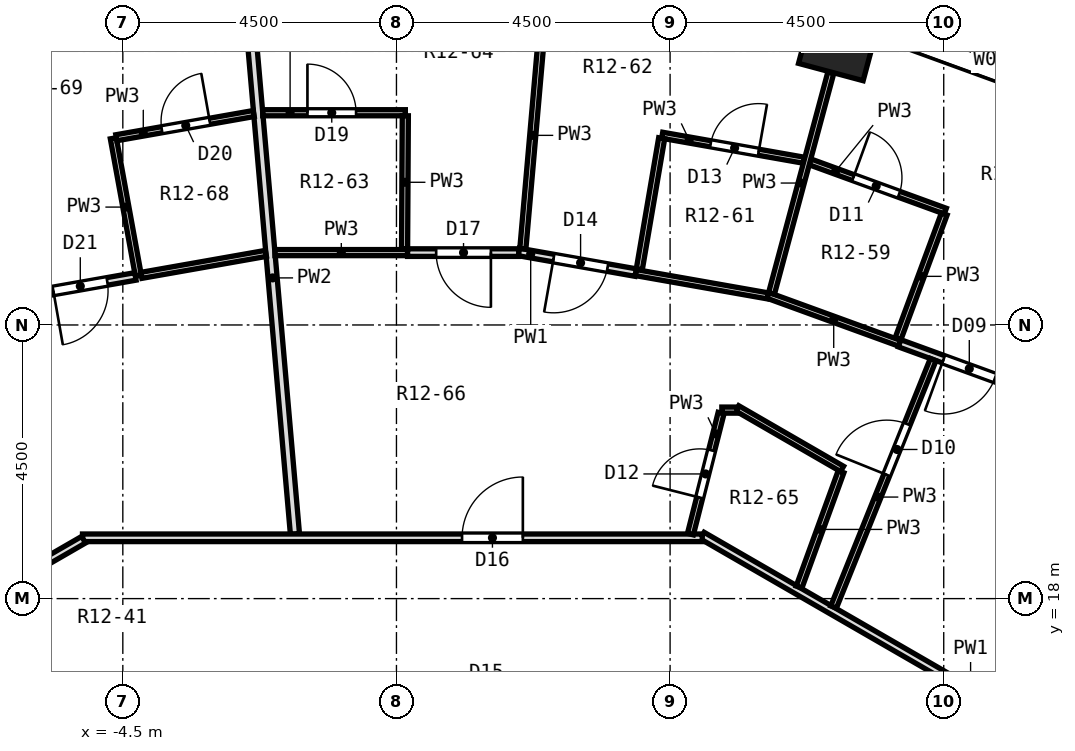
"""IFC4 building model, lengths in metres.
Left out: names, types, materials, properties, quantities, classifications, styles, units other than length and angle.
Written with IfcOpenShell. Run it as: python <this file> out.ifc"""

import sys

from ifc_helpers import new_model, si_unit, direction, frame, frame_2d, origin, origin_2d, place, context, subcontext, project, spatial, rectangle, extrude, element, fill, save


model = new_model("IFC4")
c1 = context("Model", 3, precision=1e-05, world=origin(), true_north=direction((0.0, 1.0)))
c2 = subcontext(c1, "Body", "Model", "MODEL_VIEW")
j1 = project(units=[si_unit("LENGTHUNIT", "METRE"), si_unit("PLANEANGLEUNIT", "RADIAN")], contexts=[c1])
p1 = place(None, origin())
s1 = spatial("IfcSite", under=j1, at=p1, CompositionType="ELEMENT")
p2 = place(p1, origin())
s2 = spatial("IfcBuilding", under=s1, at=p2, CompositionType="ELEMENT")
p3 = place(p2, frame((0.0, 0.0, 56.0)))
s3 = spatial("IfcBuildingStorey", under=s2, at=p3, CompositionType="ELEMENT", Elevation=56.0)
p4 = place(p3, frame((7.286, 27.191, 0.0), z_axis=(0.0, 0.0, 1.0), x_axis=(0.258819045103, 0.965925826289, 0.0)))
e1 = element("IfcColumn", 1, at=p4, inside=s3, PredefinedType="COLUMN", context=c2, shape_type="SweptSolid", body=[
    extrude(rectangle(XDim=1.1, YDim=1.1, at=origin_2d()), origin(), (0.0, 0.0, 1.0), 3.3),
])
p5 = place(p3, frame((11.585, 26.208, 0.0), z_axis=(0.0, 0.0, 1.0), x_axis=(-0.939689588564, 0.342028474173, 0.0)))
e2 = element("IfcWall", 2, at=p5, inside=s3, PredefinedType="SOLIDWALL", context=c2, shape_type="SweptSolid", body=[
    extrude(rectangle(XDim=3.846, YDim=0.6, at=frame_2d((1.923, 0.0))), origin(), (0.0, 0.0, 1.0), 2.75),
])
p6 = place(p5, frame((0.723, 0.0, 0.9)))
e3 = element("IfcOpeningElement", 3, at=p6, cuts=e2, PredefinedType="OPENING", context=c2, shape_type="SweptSolid", body=[
    extrude(rectangle(XDim=2.4, YDim=1.8, at=frame_2d((1.2, 0.9))), frame((0.0, 0.312, 0.0), z_axis=(0.0, -1.0, 0.0), x_axis=(1.0, 0.0, 0.0)), (0.0, 0.0, 1.0), 0.624),
])
p7 = place(p3, frame((-2.405, 27.485, 0.0), z_axis=(0.0, 0.0, 1.0), x_axis=(0.086942360441, -0.996213343597, 0.0)))
e4 = element("IfcWall", 4, at=p7, inside=s3, PredefinedType="PARTITIONING", context=c2, shape_type="SweptSolid", body=[
    extrude(rectangle(XDim=8.455, YDim=0.15, at=frame_2d((4.228, 0.0))), origin(), (0.0, 0.0, 1.0), 2.75),
])
p8 = place(p3, frame((-4.656, 25.57, 0.0), z_axis=(0.0, 0.0, 1.0), x_axis=(0.179165642613, -0.983818922621, 0.0)))
e5 = element("IfcWall", 5, at=p8, inside=s3, PredefinedType="PARTITIONING", context=c2, shape_type="SweptSolid", body=[
    extrude(rectangle(XDim=2.3, YDim=0.1, at=frame_2d((1.15, 0.0))), origin(), (0.0, 0.0, 1.0), 2.75),
])
p9 = place(p3, frame((5.029, 19.036, 0.0), z_axis=(0.0, 0.0, 1.0), x_axis=(0.866024825845, -0.50000100102, 0.0)))
e6 = element("IfcWall", 6, at=p9, inside=s3, PredefinedType="PARTITIONING", context=c2, shape_type="SweptSolid", body=[
    extrude(rectangle(XDim=10.192, YDim=0.125, at=frame_2d((5.096, 0.0))), origin(), (0.0, 0.0, 1.0), 2.75),
])
p10 = place(p3, frame((5.604, 21.129, 0.0), z_axis=(0.0, 0.0, 1.0), x_axis=(0.865901665176, -0.500214260339, 0.0)))
e7 = element("IfcWall", 7, at=p10, inside=s3, PredefinedType="PARTITIONING", context=c2, shape_type="SweptSolid", body=[
    extrude(rectangle(XDim=1.991, YDim=0.1, at=frame_2d((0.996, 0.0))), origin(), (0.0, 0.0, 1.0), 2.75),
])
p11 = place(p3, frame((6.107, 22.987, 0.0), z_axis=(0.0, 0.0, 1.0), x_axis=(0.939734670151, -0.34190459154, 0.0)))
e8 = element("IfcWall", 8, at=p11, inside=s3, PredefinedType="PARTITIONING", context=c2, shape_type="SweptSolid", body=[
    extrude(rectangle(XDim=2.306, YDim=0.1, at=frame_2d((1.153, 0.0))), origin(), (0.0, 0.0, 1.0), 2.75),
])
p12 = place(p3, frame((8.274, 22.199, 0.0), z_axis=(0.0, 0.0, 1.0), x_axis=(0.939613884944, -0.342236390848, 0.0)))
e9 = element("IfcWall", 9, at=p12, inside=s3, PredefinedType="PARTITIONING", context=c2, shape_type="SweptSolid", body=[
    extrude(rectangle(XDim=1.828, YDim=0.125, at=frame_2d((0.914, 0.0))), origin(), (0.0, 0.0, 1.0), 2.75),
])
p13 = place(p12, frame((0.77, 0.0, 0.0)))
e10 = element("IfcOpeningElement", 10, at=p13, cuts=e9, PredefinedType="OPENING", context=c2, shape_type="SweptSolid", body=[
    extrude(rectangle(XDim=0.9, YDim=2.1, at=frame_2d((0.45, 1.05))), frame((0.0, 0.074, 0.0), z_axis=(0.0, -1.0, 0.0), x_axis=(1.0, 0.0, 0.0)), (0.0, 0.0, 1.0), 0.149),
])
p14 = place(p3, frame((6.799, 25.183, 0.0), z_axis=(0.0, 0.0, 1.0), x_axis=(0.939651971579, -0.342131805461, 0.0)))
e11 = element("IfcWall", 11, at=p14, inside=s3, PredefinedType="PARTITIONING", context=c2, shape_type="SweptSolid", body=[
    extrude(rectangle(XDim=2.37, YDim=0.1, at=frame_2d((1.185, 0.0))), origin(), (0.0, 0.0, 1.0), 2.75),
])
p15 = place(p14, frame((0.76, 0.0, 0.0)))
e12 = element("IfcOpeningElement", 12, at=p15, cuts=e11, PredefinedType="OPENING", context=c2, shape_type="SweptSolid", body=[
    extrude(rectangle(XDim=0.8, YDim=2.1, at=frame_2d((0.4, 1.05))), frame((0.0, 0.062, 0.0), z_axis=(0.0, -1.0, 0.0), x_axis=(1.0, 0.0, 0.0)), (0.0, 0.0, 1.0), 0.124),
])
p16 = place(p3, frame((3.934, 23.362, 0.0), z_axis=(0.0, 0.0, 1.0), x_axis=(0.984819200986, -0.173583240462, 0.0)))
e13 = element("IfcWall", 13, at=p16, inside=s3, PredefinedType="PARTITIONING", context=c2, shape_type="SweptSolid", body=[
    extrude(rectangle(XDim=2.205, YDim=0.1, at=frame_2d((1.103, 0.0))), origin(), (0.0, 0.0, 1.0), 2.75),
])
p17 = place(p3, frame((2.01, 23.701, 0.0), z_axis=(0.0, 0.0, 1.0), x_axis=(0.984788592159, -0.173756809228, 0.0)))
e14 = element("IfcWall", 14, at=p17, inside=s3, PredefinedType="PARTITIONING", context=c2, shape_type="SweptSolid", body=[
    extrude(rectangle(XDim=1.953, YDim=0.125, at=frame_2d((0.977, 0.0))), origin(), (0.0, 0.0, 1.0), 2.75),
])
p18 = place(p17, frame((0.583, 0.0, 0.0)))
e15 = element("IfcOpeningElement", 15, at=p18, cuts=e14, PredefinedType="OPENING", context=c2, shape_type="SweptSolid", body=[
    extrude(rectangle(XDim=0.9, YDim=2.1, at=frame_2d((0.45, 1.05))), frame((0.0, 0.074, 0.0), z_axis=(0.0, -1.0, 0.0), x_axis=(1.0, 0.0, 0.0)), (0.0, 0.0, 1.0), 0.149),
])
p19 = place(p3, frame((4.37, 25.62, 0.0), z_axis=(0.0, 0.0, 1.0), x_axis=(0.984804303523, -0.173667739554, 0.0)))
e16 = element("IfcWall", 16, at=p19, inside=s3, PredefinedType="PARTITIONING", context=c2, shape_type="SweptSolid", body=[
    extrude(rectangle(XDim=2.369, YDim=0.1, at=frame_2d((1.184, 0.0))), origin(), (0.0, 0.0, 1.0), 2.75),
])
p20 = place(p19, frame((0.809, 0.0, 0.0)))
e17 = element("IfcOpeningElement", 17, at=p20, cuts=e16, PredefinedType="OPENING", context=c2, shape_type="SweptSolid", body=[
    extrude(rectangle(XDim=0.8, YDim=2.1, at=frame_2d((0.4, 1.05))), frame((0.0, 0.062, 0.0), z_axis=(0.0, -1.0, 0.0), x_axis=(1.0, 0.0, 0.0)), (0.0, 0.0, 1.0), 0.124),
])
p21 = place(p3, frame((-5.163, 19.0, 0.0), z_axis=(0.0, 0.0, 1.0), x_axis=(1.0, 0.0, 0.0)))
e18 = element("IfcWall", 18, at=p21, inside=s3, PredefinedType="PARTITIONING", context=c2, shape_type="SweptSolid", body=[
    extrude(rectangle(XDim=10.192, YDim=0.125, at=frame_2d((5.096, 0.0))), origin(), (0.0, 0.0, 1.0), 2.75),
])
p22 = place(p21, frame((6.242, 0.0, 0.0)))
e19 = element("IfcOpeningElement", 19, at=p22, cuts=e18, PredefinedType="OPENING", context=c2, shape_type="SweptSolid", body=[
    extrude(rectangle(XDim=1.0, YDim=2.1, at=frame_2d((0.5, 1.05))), frame((0.0, 0.074, 0.0), z_axis=(0.0, -1.0, 0.0), x_axis=(1.0, 0.0, 0.0)), (0.0, 0.0, 1.0), 0.149),
])
p23 = place(p3, frame((5.351, 21.1, 0.0), z_axis=(0.0, 0.0, 1.0), x_axis=(1.0, 0.0, 0.0)))
e20 = element("IfcWall", 20, at=p23, inside=s3, PredefinedType="PARTITIONING", context=c2, shape_type="SweptSolid", body=[
    extrude(rectangle(XDim=0.253, YDim=0.1, at=frame_2d((0.126, 0.0))), origin(), (0.0, 0.0, 1.0), 2.75),
])
p24 = place(p3, frame((-1.998, 23.69, 0.0), z_axis=(0.0, 0.0, 1.0), x_axis=(1.0, 0.0, 0.0)))
e21 = element("IfcWall", 21, at=p24, inside=s3, PredefinedType="PARTITIONING", context=c2, shape_type="SweptSolid", body=[
    extrude(rectangle(XDim=2.181, YDim=0.1, at=frame_2d((1.091, 0.0))), origin(), (0.0, 0.0, 1.0), 2.75),
])
p25 = place(p3, frame((0.183, 23.69, 0.0), z_axis=(0.0, 0.0, 1.0), x_axis=(1.0, 0.0, 0.0)))
e22 = element("IfcWall", 22, at=p25, inside=s3, PredefinedType="PARTITIONING", context=c2, shape_type="SweptSolid", body=[
    extrude(rectangle(XDim=1.827, YDim=0.125, at=frame_2d((0.914, 0.0))), origin(), (0.0, 0.0, 1.0), 2.75),
])
p26 = place(p25, frame((0.47, 0.0, 0.0)))
e23 = element("IfcOpeningElement", 23, at=p26, cuts=e22, PredefinedType="OPENING", context=c2, shape_type="SweptSolid", body=[
    extrude(rectangle(XDim=0.9, YDim=2.1, at=frame_2d((0.45, 1.05))), frame((0.0, 0.074, 0.0), z_axis=(0.0, -1.0, 0.0), x_axis=(1.0, 0.0, 0.0)), (0.0, 0.0, 1.0), 0.149),
])
p27 = place(p3, frame((-2.199, 25.99, 0.0), z_axis=(0.0, 0.0, 1.0), x_axis=(1.0, 0.0, 0.0)))
e24 = element("IfcWall", 24, at=p27, inside=s3, PredefinedType="PARTITIONING", context=c2, shape_type="SweptSolid", body=[
    extrude(rectangle(XDim=2.345, YDim=0.1, at=frame_2d((1.172, 0.0))), origin(), (0.0, 0.0, 1.0), 2.75),
])
p28 = place(p27, frame((0.735, 0.0, 0.0)))
e25 = element("IfcOpeningElement", 25, at=p28, cuts=e24, PredefinedType="OPENING", context=c2, shape_type="SweptSolid", body=[
    extrude(rectangle(XDim=0.8, YDim=2.1, at=frame_2d((0.4, 1.05))), frame((0.0, 0.062, 0.0), z_axis=(0.0, -1.0, 0.0), x_axis=(1.0, 0.0, 0.0)), (0.0, 0.0, 1.0), 0.124),
])
p29 = place(p3, frame((-4.195, 23.316, 0.0), z_axis=(0.0, 0.0, 1.0), x_axis=(0.984788286148, 0.173758543574, 0.0)))
e26 = element("IfcWall", 26, at=p29, inside=s3, PredefinedType="PARTITIONING", context=c2, shape_type="SweptSolid", body=[
    extrude(rectangle(XDim=2.08, YDim=0.1, at=frame_2d((1.04, 0.0))), origin(), (0.0, 0.0, 1.0), 2.75),
])
p30 = place(p3, frame((-6.218, 22.959, 0.0), z_axis=(0.0, 0.0, 1.0), x_axis=(0.984803677322, 0.173671290469, 0.0)))
e27 = element("IfcWall", 27, at=p30, inside=s3, PredefinedType="PARTITIONING", context=c2, shape_type="SweptSolid", body=[
    extrude(rectangle(XDim=1.954, YDim=0.125, at=frame_2d((0.977, 0.0))), origin(), (0.0, 0.0, 1.0), 2.75),
])
p31 = place(p30, frame((0.584, 0.0, 0.0)))
e28 = element("IfcOpeningElement", 28, at=p31, cuts=e27, PredefinedType="OPENING", context=c2, shape_type="SweptSolid", body=[
    extrude(rectangle(XDim=0.9, YDim=2.1, at=frame_2d((0.45, 1.05))), frame((0.0, 0.074, 0.0), z_axis=(0.0, -1.0, 0.0), x_axis=(1.0, 0.0, 0.0)), (0.0, 0.0, 1.0), 0.149),
])
p32 = place(p3, frame((-4.607, 25.579, 0.0), z_axis=(0.0, 0.0, 1.0), x_axis=(0.984796414822, 0.173712467465, 0.0)))
e29 = element("IfcWall", 29, at=p32, inside=s3, PredefinedType="PARTITIONING", context=c2, shape_type="SweptSolid", body=[
    extrude(rectangle(XDim=2.294, YDim=0.1, at=frame_2d((1.147, 0.0))), origin(), (0.0, 0.0, 1.0), 2.75),
])
p33 = place(p32, frame((0.76, 0.0, 0.0)))
e30 = element("IfcOpeningElement", 30, at=p33, cuts=e29, PredefinedType="OPENING", context=c2, shape_type="SweptSolid", body=[
    extrude(rectangle(XDim=0.8, YDim=2.1, at=frame_2d((0.4, 1.05))), frame((0.0, 0.062, 0.0), z_axis=(0.0, -1.0, 0.0), x_axis=(1.0, 0.0, 0.0)), (0.0, 0.0, 1.0), 0.124),
])
p34 = place(p3, frame((-13.971, 13.873, 0.0), z_axis=(0.0, 0.0, 1.0), x_axis=(0.866024825845, 0.50000100102, 0.0)))
e31 = element("IfcWall", 31, at=p34, inside=s3, PredefinedType="PARTITIONING", context=c2, shape_type="SweptSolid", body=[
    extrude(rectangle(XDim=10.192, YDim=0.125, at=frame_2d((5.096, 0.0))), origin(), (0.0, 0.0, 1.0), 2.75),
])
p35 = place(p3, frame((7.188, 17.861, 0.0), z_axis=(0.0, 0.0, 1.0), x_axis=(0.373452567141, 0.927649276449, 0.0)))
e32 = element("IfcWall", 32, at=p35, inside=s3, PredefinedType="PARTITIONING", context=c2, shape_type="SweptSolid", body=[
    extrude(rectangle(XDim=4.387, YDim=0.1, at=frame_2d((2.194, 0.0))), origin(), (0.0, 0.0, 1.0), 2.75),
])
p36 = place(p35, frame((2.344, 0.0, 0.0)))
e33 = element("IfcOpeningElement", 33, at=p36, cuts=e32, PredefinedType="OPENING", context=c2, shape_type="SweptSolid", body=[
    extrude(rectangle(XDim=0.9, YDim=2.1, at=frame_2d((0.45, 1.05))), frame((0.0, 0.062, 0.0), z_axis=(0.0, -1.0, 0.0), x_axis=(1.0, 0.0, 0.0)), (0.0, 0.0, 1.0), 0.124),
])
p37 = place(p3, frame((8.249, 22.275, 0.0), z_axis=(0.0, 0.0, 1.0), x_axis=(0.347437983371, 0.937702963476, 0.0)))
e34 = element("IfcWall", 34, at=p37, inside=s3, PredefinedType="PARTITIONING", context=c2, shape_type="SweptSolid", body=[
    extrude(rectangle(XDim=2.187, YDim=0.1, at=frame_2d((1.093, 0.0))), origin(), (0.0, 0.0, 1.0), 2.75),
])
p38 = place(p3, frame((6.62, 18.189, 0.0), z_axis=(0.0, 0.0, 1.0), x_axis=(0.341976076059, 0.939708658789, 0.0)))
e35 = element("IfcWall", 35, at=p38, inside=s3, PredefinedType="PARTITIONING", context=c2, shape_type="SweptSolid", body=[
    extrude(rectangle(XDim=2.019, YDim=0.1, at=frame_2d((1.01, 0.0))), origin(), (0.0, 0.0, 1.0), 2.75),
])
p39 = place(p3, frame((6.168, 23.018, 0.0), z_axis=(0.0, 0.0, 1.0), x_axis=(0.259367918518, 0.965778588934, 0.0)))
e36 = element("IfcWall", 36, at=p39, inside=s3, PredefinedType="PARTITIONING", context=c2, shape_type="SweptSolid", body=[
    extrude(rectangle(XDim=3.76, YDim=0.1, at=frame_2d((1.88, 0.0))), origin(), (0.0, 0.0, 1.0), 2.75),
])
p40 = place(p3, frame((4.834, 19.061, 0.0), z_axis=(0.0, 0.0, 1.0), x_axis=(0.245583064142, 0.969375550861, 0.0)))
e37 = element("IfcWall", 37, at=p40, inside=s3, PredefinedType="PARTITIONING", context=c2, shape_type="SweptSolid", body=[
    extrude(rectangle(XDim=2.054, YDim=0.1, at=frame_2d((1.027, 0.0))), origin(), (0.0, 0.0, 1.0), 2.75),
])
p41 = place(p40, frame((0.621, 0.0, 0.0)))
e38 = element("IfcOpeningElement", 38, at=p41, cuts=e37, PredefinedType="OPENING", context=c2, shape_type="SweptSolid", body=[
    extrude(rectangle(XDim=0.8, YDim=2.1, at=frame_2d((0.4, 1.05))), frame((0.0, 0.062, 0.0), z_axis=(0.0, -1.0, 0.0), x_axis=(1.0, 0.0, 0.0)), (0.0, 0.0, 1.0), 0.124),
])
p42 = place(p3, frame((3.993, 23.415, 0.0), z_axis=(0.0, 0.0, 1.0), x_axis=(0.1683070432, 0.985734619058, 0.0)))
e39 = element("IfcWall", 39, at=p42, inside=s3, PredefinedType="PARTITIONING", context=c2, shape_type="SweptSolid", body=[
    extrude(rectangle(XDim=2.188, YDim=0.1, at=frame_2d((1.094, 0.0))), origin(), (0.0, 0.0, 1.0), 2.75),
])
p43 = place(p3, frame((2.078, 23.752, 0.0), z_axis=(0.0, 0.0, 1.0), x_axis=(0.087045714137, 0.996204318225, 0.0)))
e40 = element("IfcWall", 40, at=p43, inside=s3, PredefinedType="PARTITIONING", context=c2, shape_type="SweptSolid", body=[
    extrude(rectangle(XDim=3.747, YDim=0.1, at=frame_2d((1.874, 0.0))), origin(), (0.0, 0.0, 1.0), 2.75),
])
p44 = place(p3, frame((0.133, 23.752, 0.0), z_axis=(0.0, 0.0, 1.0), x_axis=(0.005691872083, 0.999983801165, 0.0)))
e41 = element("IfcWall", 41, at=p44, inside=s3, PredefinedType="PARTITIONING", context=c2, shape_type="SweptSolid", body=[
    extrude(rectangle(XDim=2.188, YDim=0.1, at=frame_2d((1.094, 0.0))), origin(), (0.0, 0.0, 1.0), 2.75),
])
p45 = place(p6, origin())
e42 = element("IfcWindow", 42, at=p45, inside=s3, PartitioningType="SINGLE_PANEL", PredefinedType="WINDOW", context=c2, shape_type="SweptSolid", body=[
    extrude(rectangle(XDim=2.4, YDim=1.8, at=frame_2d((1.2, 0.9))), frame((0.0, 0.18, 0.0), z_axis=(0.0, -1.0, 0.0), x_axis=(1.0, 0.0, 0.0)), (0.0, 0.0, 1.0), 0.06),
])
fill(e3, e42)
p46 = place(p13, frame((0.9, 0.0, 0.0), z_axis=(0.0, 0.0, 1.0), x_axis=(-1.0, 0.0, 0.0)))
e43 = element("IfcDoor", 43, at=p46, inside=s3, OperationType="SINGLE_SWING_RIGHT", PredefinedType="DOOR", context=c2, shape_type="SweptSolid", body=[
    extrude(rectangle(XDim=0.9, YDim=2.1, at=frame_2d((0.45, 1.05))), frame((0.0, 0.025, 0.0), z_axis=(0.0, -1.0, 0.0), x_axis=(1.0, 0.0, 0.0)), (0.0, 0.0, 1.0), 0.05),
])
fill(e10, e43)
p47 = place(p36, origin())
e44 = element("IfcDoor", 44, at=p47, inside=s3, OperationType="SINGLE_SWING_LEFT", PredefinedType="DOOR", context=c2, shape_type="SweptSolid", body=[
    extrude(rectangle(XDim=0.9, YDim=2.1, at=frame_2d((0.45, 1.05))), frame((0.0, 0.025, 0.0), z_axis=(0.0, -1.0, 0.0), x_axis=(1.0, 0.0, 0.0)), (0.0, 0.0, 1.0), 0.05),
])
fill(e33, e44)
p48 = place(p15, origin())
e45 = element("IfcDoor", 45, at=p48, inside=s3, OperationType="SINGLE_SWING_LEFT", PredefinedType="DOOR", context=c2, shape_type="SweptSolid", body=[
    extrude(rectangle(XDim=0.8, YDim=2.1, at=frame_2d((0.4, 1.05))), frame((0.0, 0.025, 0.0), z_axis=(0.0, -1.0, 0.0), x_axis=(1.0, 0.0, 0.0)), (0.0, 0.0, 1.0), 0.05),
])
fill(e12, e45)
p49 = place(p41, origin())
e46 = element("IfcDoor", 46, at=p49, inside=s3, OperationType="SINGLE_SWING_LEFT", PredefinedType="DOOR", context=c2, shape_type="SweptSolid", body=[
    extrude(rectangle(XDim=0.8, YDim=2.1, at=frame_2d((0.4, 1.05))), frame((0.0, 0.025, 0.0), z_axis=(0.0, -1.0, 0.0), x_axis=(1.0, 0.0, 0.0)), (0.0, 0.0, 1.0), 0.05),
])
fill(e38, e46)
p50 = place(p20, origin())
e47 = element("IfcDoor", 47, at=p50, inside=s3, OperationType="SINGLE_SWING_RIGHT", PredefinedType="DOOR", context=c2, shape_type="SweptSolid", body=[
    extrude(rectangle(XDim=0.8, YDim=2.1, at=frame_2d((0.4, 1.05))), frame((0.0, 0.025, 0.0), z_axis=(0.0, -1.0, 0.0), x_axis=(1.0, 0.0, 0.0)), (0.0, 0.0, 1.0), 0.05),
])
fill(e17, e47)
p51 = place(p18, frame((0.9, 0.0, 0.0), z_axis=(0.0, 0.0, 1.0), x_axis=(-1.0, 0.0, 0.0)))
e48 = element("IfcDoor", 48, at=p51, inside=s3, OperationType="SINGLE_SWING_RIGHT", PredefinedType="DOOR", context=c2, shape_type="SweptSolid", body=[
    extrude(rectangle(XDim=0.9, YDim=2.1, at=frame_2d((0.45, 1.05))), frame((0.0, 0.025, 0.0), z_axis=(0.0, -1.0, 0.0), x_axis=(1.0, 0.0, 0.0)), (0.0, 0.0, 1.0), 0.05),
])
fill(e15, e48)
p52 = place(p22, origin())
e49 = element("IfcDoor", 49, at=p52, inside=s3, OperationType="SINGLE_SWING_RIGHT", PredefinedType="DOOR", context=c2, shape_type="SweptSolid", body=[
    extrude(rectangle(XDim=1.0, YDim=2.1, at=frame_2d((0.5, 1.05))), frame((0.0, 0.025, 0.0), z_axis=(0.0, -1.0, 0.0), x_axis=(1.0, 0.0, 0.0)), (0.0, 0.0, 1.0), 0.05),
])
fill(e19, e49)
p53 = place(p26, frame((0.9, 0.0, 0.0), z_axis=(0.0, 0.0, 1.0), x_axis=(-1.0, 0.0, 0.0)))
e50 = element("IfcDoor", 50, at=p53, inside=s3, OperationType="SINGLE_SWING_LEFT", PredefinedType="DOOR", context=c2, shape_type="SweptSolid", body=[
    extrude(rectangle(XDim=0.9, YDim=2.1, at=frame_2d((0.45, 1.05))), frame((0.0, 0.025, 0.0), z_axis=(0.0, -1.0, 0.0), x_axis=(1.0, 0.0, 0.0)), (0.0, 0.0, 1.0), 0.05),
])
fill(e23, e50)
p54 = place(p28, origin())
e51 = element("IfcDoor", 51, at=p54, inside=s3, OperationType="SINGLE_SWING_LEFT", PredefinedType="DOOR", context=c2, shape_type="SweptSolid", body=[
    extrude(rectangle(XDim=0.8, YDim=2.1, at=frame_2d((0.4, 1.05))), frame((0.0, 0.025, 0.0), z_axis=(0.0, -1.0, 0.0), x_axis=(1.0, 0.0, 0.0)), (0.0, 0.0, 1.0), 0.05),
])
fill(e25, e51)
p55 = place(p33, origin())
e52 = element("IfcDoor", 52, at=p55, inside=s3, OperationType="SINGLE_SWING_RIGHT", PredefinedType="DOOR", context=c2, shape_type="SweptSolid", body=[
    extrude(rectangle(XDim=0.8, YDim=2.1, at=frame_2d((0.4, 1.05))), frame((0.0, 0.025, 0.0), z_axis=(0.0, -1.0, 0.0), x_axis=(1.0, 0.0, 0.0)), (0.0, 0.0, 1.0), 0.05),
])
fill(e30, e52)
p56 = place(p31, frame((0.9, 0.0, 0.0), z_axis=(0.0, 0.0, 1.0), x_axis=(-1.0, 0.0, 0.0)))
e53 = element("IfcDoor", 53, at=p56, inside=s3, OperationType="SINGLE_SWING_RIGHT", PredefinedType="DOOR", context=c2, shape_type="SweptSolid", body=[
    extrude(rectangle(XDim=0.9, YDim=2.1, at=frame_2d((0.45, 1.05))), frame((0.0, 0.025, 0.0), z_axis=(0.0, -1.0, 0.0), x_axis=(1.0, 0.0, 0.0)), (0.0, 0.0, 1.0), 0.05),
])
fill(e28, e53)
save(model, sys.argv[1])
